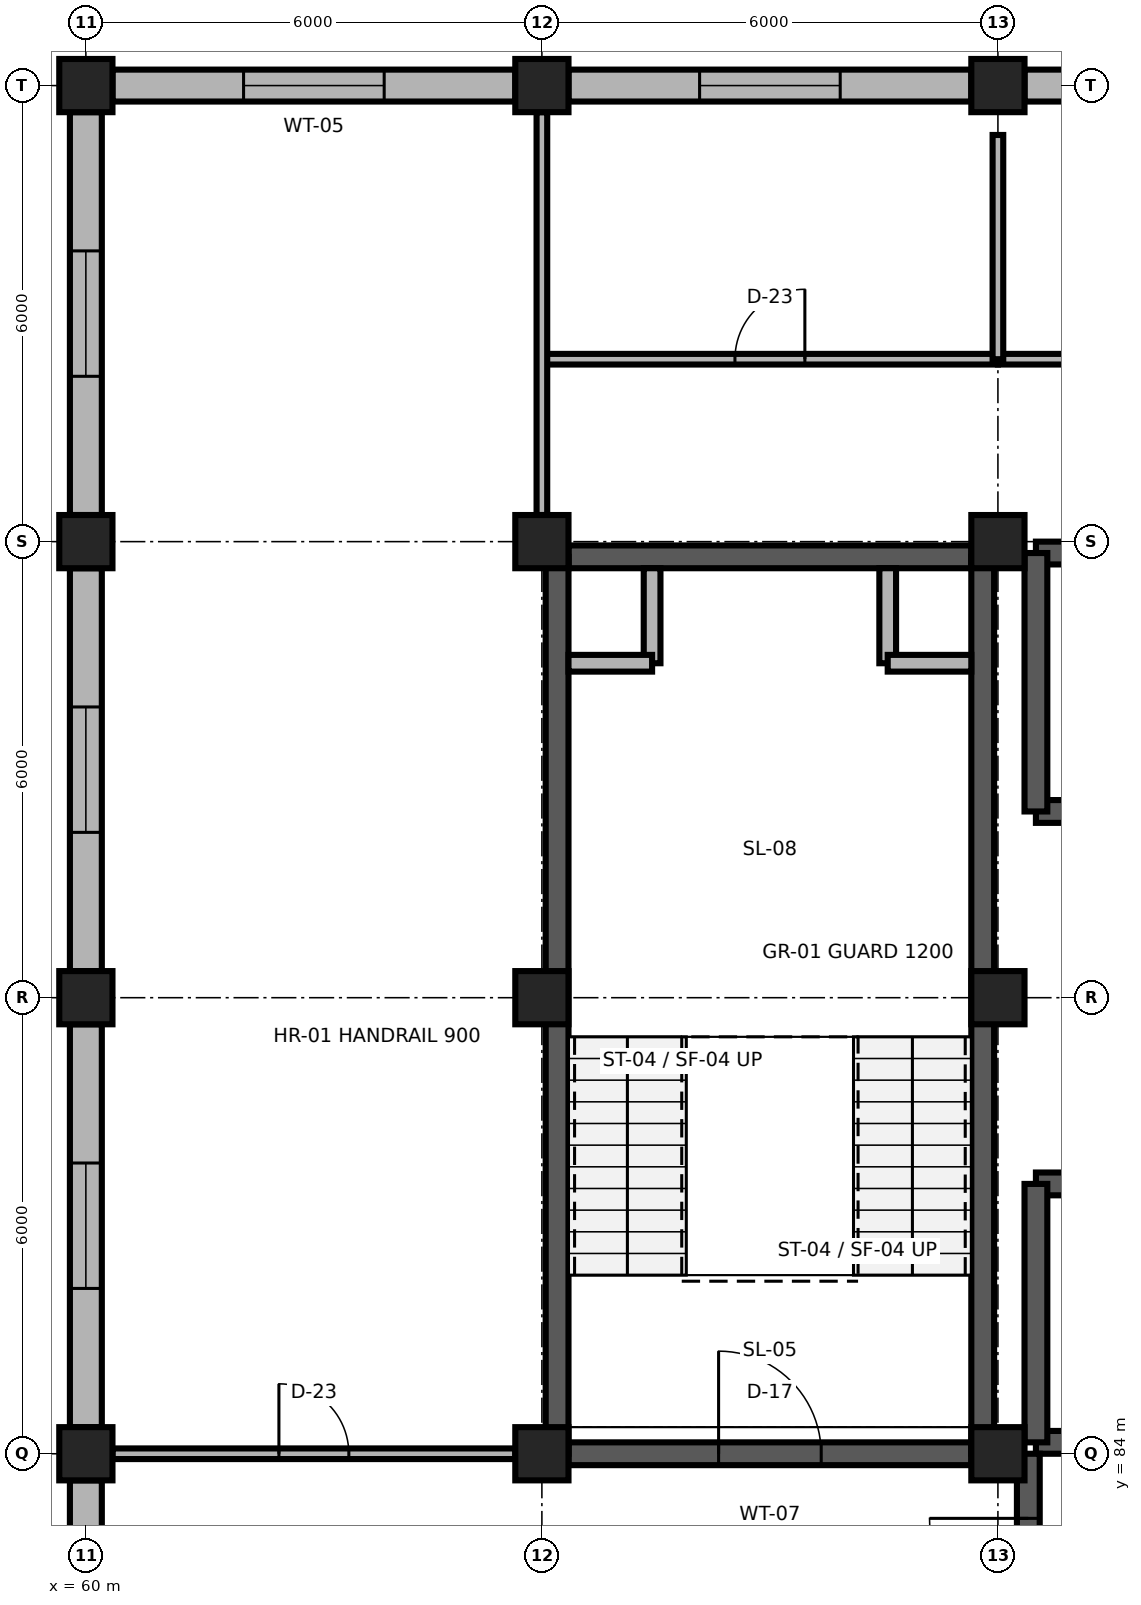
"""IFC4 building model, lengths in metres.
Left out: names, types, materials, properties, quantities, classifications, styles, units other than length and angle.
Written with IfcOpenShell. Run it as: python <this file> out.ifc"""

import sys

from ifc_helpers import new_model, si_unit, direction, frame, frame_2d, origin, origin_2d, place, context, subcontext, project, spatial, rectangle, extrude, element, fill, save


model = new_model("IFC4")
c1 = context("Model", 3, precision=1e-05, world=origin(), true_north=direction((0.0, 1.0)))
c2 = subcontext(c1, "Body", "Model", "MODEL_VIEW")
j1 = project(units=[si_unit("LENGTHUNIT", "METRE"), si_unit("PLANEANGLEUNIT", "RADIAN")], contexts=[c1])
p1 = place(None, origin())
s1 = spatial("IfcSite", under=j1, at=p1, CompositionType="ELEMENT")
p2 = place(p1, origin())
s2 = spatial("IfcBuilding", under=s1, at=p2, CompositionType="ELEMENT")
p3 = place(p2, frame((0.0, 0.0, 48.3)))
s3 = spatial("IfcBuildingStorey", under=s2, at=p3, CompositionType="ELEMENT", Elevation=48.3)
for number, where, z_axis, x_axis in (
    (1, (60.0, 84.0, 0.0), (0.0, 0.0, 1.0), (1.0, 0.0, 0.0)),
    (2, (66.0, 84.0, 0.0), (0.0, 0.0, 1.0), (1.0, 0.0, 0.0)),
    (3, (72.0, 84.0, 0.0), (0.0, 0.0, 1.0), (1.0, 0.0, 0.0)),
    (4, (60.0, 90.0, 0.0), (0.0, 0.0, 1.0), (1.0, 0.0, 0.0)),
    (5, (66.0, 90.0, 0.0), (0.0, 0.0, 1.0), (1.0, 0.0, 0.0)),
    (6, (72.0, 90.0, 0.0), (0.0, 0.0, 1.0), (1.0, 0.0, 0.0)),
    (7, (60.0, 96.0, 0.0), (0.0, 0.0, 1.0), (1.0, 0.0, 0.0)),
    (8, (66.0, 96.0, 0.0), (0.0, 0.0, 1.0), (1.0, 0.0, 0.0)),
    (9, (72.0, 96.0, 0.0), (0.0, 0.0, 1.0), (1.0, 0.0, 0.0)),
    (10, (60.0, 102.0, 0.0), (0.0, 0.0, 1.0), (1.0, 0.0, 0.0)),
    (11, (66.0, 102.0, 0.0), (0.0, 0.0, 1.0), (1.0, 0.0, 0.0)),
    (12, (72.0, 102.0, 0.0), (0.0, 0.0, 1.0), (1.0, 0.0, 0.0)),
):
    element("IfcColumn", number, at=place(p3, frame(where, z_axis=z_axis, x_axis=x_axis)), inside=s3, PredefinedType="COLUMN", context=c2, shape_type="SweptSolid", body=[
        extrude(rectangle(XDim=0.7, YDim=0.7, at=origin_2d()), origin(), (0.0, 0.0, 1.0), 3.9),
    ])
p4 = place(p3, frame((60.35, 102.0, 0.0), z_axis=(0.0, 0.0, 1.0), x_axis=(1.0, 0.0, 0.0)))
e13 = element("IfcWall", 13, at=p4, inside=s3, PredefinedType="SOLIDWALL", context=c2, shape_type="SweptSolid", body=[
    extrude(rectangle(XDim=5.3, YDim=0.42, at=frame_2d((2.65, 0.0))), origin(), (0.0, 0.0, 1.0), 3.26),
])
p5 = place(p4, frame((1.725, 0.0, 0.85)))
e14 = element("IfcOpeningElement", 14, at=p5, cuts=e13, PredefinedType="OPENING", context=c2, shape_type="SweptSolid", body=[
    extrude(rectangle(XDim=1.85, YDim=2.0, at=frame_2d((0.925, 1.0))), frame((0.0, 0.225, 0.0), z_axis=(0.0, -1.0, 0.0), x_axis=(1.0, 0.0, 0.0)), (0.0, 0.0, 1.0), 0.45),
])
p6 = place(p3, frame((66.35, 102.0, 0.0), z_axis=(0.0, 0.0, 1.0), x_axis=(1.0, 0.0, 0.0)))
e15 = element("IfcWall", 15, at=p6, inside=s3, PredefinedType="SOLIDWALL", context=c2, shape_type="SweptSolid", body=[
    extrude(rectangle(XDim=5.3, YDim=0.42, at=frame_2d((2.65, 0.0))), origin(), (0.0, 0.0, 1.0), 3.26),
])
p7 = place(p6, frame((1.725, 0.0, 0.85)))
e16 = element("IfcOpeningElement", 16, at=p7, cuts=e15, PredefinedType="OPENING", context=c2, shape_type="SweptSolid", body=[
    extrude(rectangle(XDim=1.85, YDim=2.0, at=frame_2d((0.925, 1.0))), frame((0.0, 0.225, 0.0), z_axis=(0.0, -1.0, 0.0), x_axis=(1.0, 0.0, 0.0)), (0.0, 0.0, 1.0), 0.45),
])
p8 = place(p3, frame((72.35, 102.0, 0.0), z_axis=(0.0, 0.0, 1.0), x_axis=(1.0, 0.0, 0.0)))
e17 = element("IfcWall", 17, at=p8, inside=s3, PredefinedType="SOLIDWALL", context=c2, shape_type="SweptSolid", body=[
    extrude(rectangle(XDim=5.3, YDim=0.42, at=frame_2d((2.65, 0.0))), origin(), (0.0, 0.0, 1.0), 3.26),
])
p9 = place(p8, frame((1.725, 0.0, 0.85)))
e18 = element("IfcOpeningElement", 18, at=p9, cuts=e17, PredefinedType="OPENING", context=c2, shape_type="SweptSolid", body=[
    extrude(rectangle(XDim=1.85, YDim=2.0, at=frame_2d((0.925, 1.0))), frame((0.0, 0.225, 0.0), z_axis=(0.0, -1.0, 0.0), x_axis=(1.0, 0.0, 0.0)), (0.0, 0.0, 1.0), 0.45),
])
p10 = place(p3, frame((60.0, 78.35, 0.0), z_axis=(0.0, 0.0, 1.0), x_axis=(0.0, 1.0, 0.0)))
e19 = element("IfcWall", 19, at=p10, inside=s3, PredefinedType="SOLIDWALL", context=c2, shape_type="SweptSolid", body=[
    extrude(rectangle(XDim=5.3, YDim=0.42, at=frame_2d((2.65, 0.0))), origin(), (0.0, 0.0, 1.0), 3.26),
])
p11 = place(p10, frame((1.825, 0.0, 0.85)))
e20 = element("IfcOpeningElement", 20, at=p11, cuts=e19, PredefinedType="OPENING", context=c2, shape_type="SweptSolid", body=[
    extrude(rectangle(XDim=1.65, YDim=1.95, at=frame_2d((0.825, 0.975))), frame((0.0, 0.225, 0.0), z_axis=(0.0, -1.0, 0.0), x_axis=(1.0, 0.0, 0.0)), (0.0, 0.0, 1.0), 0.45),
])
p12 = place(p3, frame((60.0, 84.35, 0.0), z_axis=(0.0, 0.0, 1.0), x_axis=(0.0, 1.0, 0.0)))
e21 = element("IfcWall", 21, at=p12, inside=s3, PredefinedType="SOLIDWALL", context=c2, shape_type="SweptSolid", body=[
    extrude(rectangle(XDim=5.3, YDim=0.42, at=frame_2d((2.65, 0.0))), origin(), (0.0, 0.0, 1.0), 3.26),
])
p13 = place(p12, frame((1.825, 0.0, 0.85)))
e22 = element("IfcOpeningElement", 22, at=p13, cuts=e21, PredefinedType="OPENING", context=c2, shape_type="SweptSolid", body=[
    extrude(rectangle(XDim=1.65, YDim=1.95, at=frame_2d((0.825, 0.975))), frame((0.0, 0.225, 0.0), z_axis=(0.0, -1.0, 0.0), x_axis=(1.0, 0.0, 0.0)), (0.0, 0.0, 1.0), 0.45),
])
p14 = place(p3, frame((60.0, 90.35, 0.0), z_axis=(0.0, 0.0, 1.0), x_axis=(0.0, 1.0, 0.0)))
e23 = element("IfcWall", 23, at=p14, inside=s3, PredefinedType="SOLIDWALL", context=c2, shape_type="SweptSolid", body=[
    extrude(rectangle(XDim=5.3, YDim=0.42, at=frame_2d((2.65, 0.0))), origin(), (0.0, 0.0, 1.0), 3.26),
])
p15 = place(p14, frame((1.825, 0.0, 0.85)))
e24 = element("IfcOpeningElement", 24, at=p15, cuts=e23, PredefinedType="OPENING", context=c2, shape_type="SweptSolid", body=[
    extrude(rectangle(XDim=1.65, YDim=1.95, at=frame_2d((0.825, 0.975))), frame((0.0, 0.225, 0.0), z_axis=(0.0, -1.0, 0.0), x_axis=(1.0, 0.0, 0.0)), (0.0, 0.0, 1.0), 0.45),
])
p16 = place(p3, frame((60.0, 96.35, 0.0), z_axis=(0.0, 0.0, 1.0), x_axis=(0.0, 1.0, 0.0)))
e25 = element("IfcWall", 25, at=p16, inside=s3, PredefinedType="SOLIDWALL", context=c2, shape_type="SweptSolid", body=[
    extrude(rectangle(XDim=5.3, YDim=0.42, at=frame_2d((2.65, 0.0))), origin(), (0.0, 0.0, 1.0), 3.26),
])
p17 = place(p16, frame((1.825, 0.0, 0.85)))
e26 = element("IfcOpeningElement", 26, at=p17, cuts=e25, PredefinedType="OPENING", context=c2, shape_type="SweptSolid", body=[
    extrude(rectangle(XDim=1.65, YDim=1.95, at=frame_2d((0.825, 0.975))), frame((0.0, 0.225, 0.0), z_axis=(0.0, -1.0, 0.0), x_axis=(1.0, 0.0, 0.0)), (0.0, 0.0, 1.0), 0.45),
])
p18 = place(p3, frame((66.35, 84.0, 0.0), z_axis=(0.0, 0.0, 1.0), x_axis=(1.0, 0.0, 0.0)))
e27 = element("IfcWall", 27, at=p18, inside=s3, PredefinedType="SHEAR", context=c2, shape_type="SweptSolid", body=[
    extrude(rectangle(XDim=5.3, YDim=0.3, at=frame_2d((2.65, 0.0))), origin(), (0.0, 0.0, 1.0), 3.66),
])
p19 = place(p18, frame((1.975, 0.0, 0.0)))
e28 = element("IfcOpeningElement", 28, at=p19, cuts=e27, PredefinedType="OPENING", context=c2, shape_type="SweptSolid", body=[
    extrude(rectangle(XDim=1.35, YDim=2.2, at=frame_2d((0.675, 1.1))), frame((0.0, 0.165, 0.0), z_axis=(0.0, -1.0, 0.0), x_axis=(1.0, 0.0, 0.0)), (0.0, 0.0, 1.0), 0.33),
])
p20 = place(p3, frame((66.35, 95.8, 0.0), z_axis=(0.0, 0.0, 1.0), x_axis=(1.0, 0.0, 0.0)))
e29 = element("IfcWall", 29, at=p20, inside=s3, PredefinedType="SHEAR", context=c2, shape_type="SweptSolid", body=[
    extrude(rectangle(XDim=5.3, YDim=0.3, at=frame_2d((2.65, 0.0))), origin(), (0.0, 0.0, 1.0), 3.74),
])
for number, where, z_axis, x_axis in (
    (30, (66.2, 84.0, 0.0), (0.0, 0.0, 1.0), (0.0, 1.0, 0.0)),
    (31, (71.8, 84.0, 0.0), (0.0, 0.0, 1.0), (0.0, 1.0, 0.0)),
):
    element("IfcWall", number, at=place(p3, frame(where, z_axis=z_axis, x_axis=x_axis)), inside=s3, PredefinedType="SHEAR", context=c2, shape_type="SweptSolid", body=[
        extrude(rectangle(XDim=11.8, YDim=0.3, at=frame_2d((5.9, 0.0))), origin(), (0.0, 0.0, 1.0), 3.74),
    ])
p21 = place(p3, frame((67.45, 94.4, 0.0), z_axis=(0.0, 0.0, 1.0), x_axis=(0.0, 1.0, 0.0)))
e32 = element("IfcWall", 32, at=p21, inside=s3, PredefinedType="PARTITIONING", context=c2, shape_type="SweptSolid", body=[
    extrude(rectangle(XDim=1.25, YDim=0.22, at=frame_2d((0.625, 0.0))), origin(), (0.0, 0.0, 1.0), 3.74),
])
p22 = place(p3, frame((66.35, 94.4, 0.0), z_axis=(0.0, 0.0, 1.0), x_axis=(1.0, 0.0, 0.0)))
e33 = element("IfcWall", 33, at=p22, inside=s3, PredefinedType="PARTITIONING", context=c2, shape_type="SweptSolid", body=[
    extrude(rectangle(XDim=1.1, YDim=0.22, at=frame_2d((0.55, 0.0))), origin(), (0.0, 0.0, 1.0), 3.74),
])
p23 = place(p3, frame((70.55, 94.4, 0.0), z_axis=(0.0, 0.0, 1.0), x_axis=(0.0, 1.0, 0.0)))
e34 = element("IfcWall", 34, at=p23, inside=s3, PredefinedType="PARTITIONING", context=c2, shape_type="SweptSolid", body=[
    extrude(rectangle(XDim=1.25, YDim=0.22, at=frame_2d((0.625, 0.0))), origin(), (0.0, 0.0, 1.0), 3.74),
])
p24 = place(p3, frame((70.55, 94.4, 0.0), z_axis=(0.0, 0.0, 1.0), x_axis=(1.0, 0.0, 0.0)))
e35 = element("IfcWall", 35, at=p24, inside=s3, PredefinedType="PARTITIONING", context=c2, shape_type="SweptSolid", body=[
    extrude(rectangle(XDim=1.1, YDim=0.22, at=frame_2d((0.55, 0.0))), origin(), (0.0, 0.0, 1.0), 3.74),
])
p25 = place(p3, frame((72.5, 84.15, 0.0), z_axis=(0.0, 0.0, 1.0), x_axis=(1.0, 0.0, 0.0)))
e36 = element("IfcWall", 36, at=p25, inside=s3, PredefinedType="SHEAR", context=c2, shape_type="SweptSolid", body=[
    extrude(rectangle(XDim=2.5, YDim=0.3, at=frame_2d((1.25, 0.0))), origin(), (0.0, 0.0, 1.0), 3.74),
])
p26 = place(p25, frame((0.7, 0.0, 0.0)))
e37 = element("IfcOpeningElement", 37, at=p26, cuts=e36, PredefinedType="OPENING", context=c2, shape_type="SweptSolid", body=[
    extrude(rectangle(XDim=1.1, YDim=2.1, at=frame_2d((0.55, 1.05))), frame((0.0, 0.165, 0.0), z_axis=(0.0, -1.0, 0.0), x_axis=(1.0, 0.0, 0.0)), (0.0, 0.0, 1.0), 0.33),
])
p27 = place(p3, frame((72.5, 87.55, 0.0), z_axis=(0.0, 0.0, 1.0), x_axis=(1.0, 0.0, 0.0)))
e38 = element("IfcWall", 38, at=p27, inside=s3, PredefinedType="SHEAR", context=c2, shape_type="SweptSolid", body=[
    extrude(rectangle(XDim=2.5, YDim=0.3, at=frame_2d((1.25, 0.0))), origin(), (0.0, 0.0, 1.0), 3.74),
])
p28 = place(p3, frame((72.5, 84.15, 0.0), z_axis=(0.0, 0.0, 1.0), x_axis=(0.0, 1.0, 0.0)))
e39 = element("IfcWall", 39, at=p28, inside=s3, PredefinedType="SHEAR", context=c2, shape_type="SweptSolid", body=[
    extrude(rectangle(XDim=3.4, YDim=0.3, at=frame_2d((1.7, 0.0))), origin(), (0.0, 0.0, 1.0), 3.74),
])
p29 = place(p3, frame((72.5, 95.85, 0.0), z_axis=(0.0, 0.0, 1.0), x_axis=(1.0, 0.0, 0.0)))
e40 = element("IfcWall", 40, at=p29, inside=s3, PredefinedType="SHEAR", context=c2, shape_type="SweptSolid", body=[
    extrude(rectangle(XDim=2.5, YDim=0.3, at=frame_2d((1.25, 0.0))), origin(), (0.0, 0.0, 1.0), 3.74),
])
p30 = place(p29, frame((0.675, 0.0, 0.0)))
e41 = element("IfcOpeningElement", 41, at=p30, cuts=e40, PredefinedType="OPENING", context=c2, shape_type="SweptSolid", body=[
    extrude(rectangle(XDim=1.15, YDim=2.15, at=frame_2d((0.575, 1.075))), frame((0.0, 0.165, 0.0), z_axis=(0.0, -1.0, 0.0), x_axis=(1.0, 0.0, 0.0)), (0.0, 0.0, 1.0), 0.33),
])
p31 = place(p3, frame((72.5, 92.45, 0.0), z_axis=(0.0, 0.0, 1.0), x_axis=(1.0, 0.0, 0.0)))
e42 = element("IfcWall", 42, at=p31, inside=s3, PredefinedType="SHEAR", context=c2, shape_type="SweptSolid", body=[
    extrude(rectangle(XDim=2.5, YDim=0.3, at=frame_2d((1.25, 0.0))), origin(), (0.0, 0.0, 1.0), 3.74),
])
p32 = place(p3, frame((72.5, 92.45, 0.0), z_axis=(0.0, 0.0, 1.0), x_axis=(0.0, 1.0, 0.0)))
e43 = element("IfcWall", 43, at=p32, inside=s3, PredefinedType="SHEAR", context=c2, shape_type="SweptSolid", body=[
    extrude(rectangle(XDim=3.4, YDim=0.3, at=frame_2d((1.7, 0.0))), origin(), (0.0, 0.0, 1.0), 3.74),
])
p33 = place(p3, frame((72.4, 81.0, 0.0), z_axis=(0.0, 0.0, 1.0), x_axis=(0.0, 1.0, 0.0)))
e44 = element("IfcWall", 44, at=p33, inside=s3, PredefinedType="SHEAR", context=c2, shape_type="SweptSolid", body=[
    extrude(rectangle(XDim=3.0, YDim=0.3, at=frame_2d((1.5, 0.0))), origin(), (0.0, 0.0, 1.0), 3.68),
])
p34 = place(p33, frame((0.85, 0.0, 0.0)))
e45 = element("IfcOpeningElement", 45, at=p34, cuts=e44, PredefinedType="OPENING", context=c2, shape_type="SweptSolid", body=[
    extrude(rectangle(XDim=1.3, YDim=2.2, at=frame_2d((0.65, 1.1))), frame((0.0, 0.165, 0.0), z_axis=(0.0, -1.0, 0.0), x_axis=(1.0, 0.0, 0.0)), (0.0, 0.0, 1.0), 0.33),
])
p35 = place(p3, frame((60.35, 84.0, 0.0), z_axis=(0.0, 0.0, 1.0), x_axis=(1.0, 0.0, 0.0)))
e46 = element("IfcWall", 46, at=p35, inside=s3, PredefinedType="PARTITIONING", context=c2, shape_type="SweptSolid", body=[
    extrude(rectangle(XDim=5.3, YDim=0.14, at=frame_2d((2.65, 0.0))), origin(), (0.0, 0.0, 1.0), 3.288),
])
p36 = place(p35, frame((2.19, 0.0, 0.0)))
e47 = element("IfcOpeningElement", 47, at=p36, cuts=e46, PredefinedType="OPENING", context=c2, shape_type="SweptSolid", body=[
    extrude(rectangle(XDim=0.92, YDim=2.15, at=frame_2d((0.46, 1.075))), frame((0.0, 0.085, 0.0), z_axis=(0.0, -1.0, 0.0), x_axis=(1.0, 0.0, 0.0)), (0.0, 0.0, 1.0), 0.17),
])
p37 = place(p3, frame((66.0, 98.4, 0.0), z_axis=(0.0, 0.0, 1.0), x_axis=(1.0, 0.0, 0.0)))
e48 = element("IfcWall", 48, at=p37, inside=s3, PredefinedType="PARTITIONING", context=c2, shape_type="SweptSolid", body=[
    extrude(rectangle(XDim=6.0, YDim=0.14, at=frame_2d((3.0, 0.0))), origin(), (0.0, 0.0, 1.0), 3.68),
])
p38 = place(p37, frame((2.54, 0.0, 0.0)))
e49 = element("IfcOpeningElement", 49, at=p38, cuts=e48, PredefinedType="OPENING", context=c2, shape_type="SweptSolid", body=[
    extrude(rectangle(XDim=0.92, YDim=2.15, at=frame_2d((0.46, 1.075))), frame((0.0, 0.085, 0.0), z_axis=(0.0, -1.0, 0.0), x_axis=(1.0, 0.0, 0.0)), (0.0, 0.0, 1.0), 0.17),
])
p39 = place(p3, frame((72.0, 98.4, 0.0), z_axis=(0.0, 0.0, 1.0), x_axis=(1.0, 0.0, 0.0)))
e50 = element("IfcWall", 50, at=p39, inside=s3, PredefinedType="PARTITIONING", context=c2, shape_type="SweptSolid", body=[
    extrude(rectangle(XDim=6.0, YDim=0.14, at=frame_2d((3.0, 0.0))), origin(), (0.0, 0.0, 1.0), 3.68),
])
p40 = place(p39, frame((2.54, 0.0, 0.0)))
e51 = element("IfcOpeningElement", 51, at=p40, cuts=e50, PredefinedType="OPENING", context=c2, shape_type="SweptSolid", body=[
    extrude(rectangle(XDim=0.92, YDim=2.15, at=frame_2d((0.46, 1.075))), frame((0.0, 0.085, 0.0), z_axis=(0.0, -1.0, 0.0), x_axis=(1.0, 0.0, 0.0)), (0.0, 0.0, 1.0), 0.17),
])
p41 = place(p3, frame((72.0, 98.4, 0.0), z_axis=(0.0, 0.0, 1.0), x_axis=(0.0, 1.0, 0.0)))
e52 = element("IfcWall", 52, at=p41, inside=s3, PredefinedType="PARTITIONING", context=c2, shape_type="SweptSolid", body=[
    extrude(rectangle(XDim=2.95, YDim=0.14, at=frame_2d((1.475, 0.0))), origin(), (0.0, 0.0, 1.0), 3.288),
])
p42 = place(p3, frame((66.0, 96.35, 0.0), z_axis=(0.0, 0.0, 1.0), x_axis=(0.0, 1.0, 0.0)))
e53 = element("IfcWall", 53, at=p42, inside=s3, PredefinedType="PARTITIONING", context=c2, shape_type="SweptSolid", body=[
    extrude(rectangle(XDim=5.3, YDim=0.14, at=frame_2d((2.65, 0.0))), origin(), (0.0, 0.0, 1.0), 3.288),
])
p43 = place(p5, origin())
e54 = element("IfcWindow", 54, at=p43, inside=s3, PartitioningType="SINGLE_PANEL", PredefinedType="WINDOW", context=c2, shape_type="SweptSolid", body=[
    extrude(rectangle(XDim=1.85, YDim=2.0, at=frame_2d((0.925, 1.0))), frame((0.0, 0.03, 0.0), z_axis=(0.0, -1.0, 0.0), x_axis=(1.0, 0.0, 0.0)), (0.0, 0.0, 1.0), 0.06),
])
fill(e14, e54)
p44 = place(p7, origin())
e55 = element("IfcWindow", 55, at=p44, inside=s3, PartitioningType="SINGLE_PANEL", PredefinedType="WINDOW", context=c2, shape_type="SweptSolid", body=[
    extrude(rectangle(XDim=1.85, YDim=2.0, at=frame_2d((0.925, 1.0))), frame((0.0, 0.03, 0.0), z_axis=(0.0, -1.0, 0.0), x_axis=(1.0, 0.0, 0.0)), (0.0, 0.0, 1.0), 0.06),
])
fill(e16, e55)
p45 = place(p13, origin())
e56 = element("IfcWindow", 56, at=p45, inside=s3, PartitioningType="SINGLE_PANEL", PredefinedType="WINDOW", context=c2, shape_type="SweptSolid", body=[
    extrude(rectangle(XDim=1.65, YDim=1.95, at=frame_2d((0.825, 0.975))), frame((0.0, 0.03, 0.0), z_axis=(0.0, -1.0, 0.0), x_axis=(1.0, 0.0, 0.0)), (0.0, 0.0, 1.0), 0.06),
])
fill(e22, e56)
p46 = place(p15, origin())
e57 = element("IfcWindow", 57, at=p46, inside=s3, PartitioningType="SINGLE_PANEL", PredefinedType="WINDOW", context=c2, shape_type="SweptSolid", body=[
    extrude(rectangle(XDim=1.65, YDim=1.95, at=frame_2d((0.825, 0.975))), frame((0.0, 0.03, 0.0), z_axis=(0.0, -1.0, 0.0), x_axis=(1.0, 0.0, 0.0)), (0.0, 0.0, 1.0), 0.06),
])
fill(e24, e57)
p47 = place(p17, origin())
e58 = element("IfcWindow", 58, at=p47, inside=s3, PartitioningType="SINGLE_PANEL", PredefinedType="WINDOW", context=c2, shape_type="SweptSolid", body=[
    extrude(rectangle(XDim=1.65, YDim=1.95, at=frame_2d((0.825, 0.975))), frame((0.0, 0.03, 0.0), z_axis=(0.0, -1.0, 0.0), x_axis=(1.0, 0.0, 0.0)), (0.0, 0.0, 1.0), 0.06),
])
fill(e26, e58)
p48 = place(p19, origin())
e59 = element("IfcDoor", 59, at=p48, inside=s3, OperationType="SINGLE_SWING_LEFT", PredefinedType="DOOR", context=c2, shape_type="SweptSolid", body=[
    extrude(rectangle(XDim=1.35, YDim=2.2, at=frame_2d((0.675, 1.1))), frame((0.0, 0.025, 0.0), z_axis=(0.0, -1.0, 0.0), x_axis=(1.0, 0.0, 0.0)), (0.0, 0.0, 1.0), 0.05),
])
fill(e28, e59)
p49 = place(p34, origin())
e60 = element("IfcDoor", 60, at=p49, inside=s3, OperationType="SINGLE_SWING_RIGHT", PredefinedType="DOOR", context=c2, shape_type="SweptSolid", body=[
    extrude(rectangle(XDim=1.3, YDim=2.2, at=frame_2d((0.65, 1.1))), frame((0.0, 0.025, 0.0), z_axis=(0.0, -1.0, 0.0), x_axis=(1.0, 0.0, 0.0)), (0.0, 0.0, 1.0), 0.05),
])
fill(e45, e60)
p50 = place(p36, origin())
e61 = element("IfcDoor", 61, at=p50, inside=s3, OperationType="SINGLE_SWING_LEFT", PredefinedType="DOOR", context=c2, shape_type="SweptSolid", body=[
    extrude(rectangle(XDim=0.92, YDim=2.15, at=frame_2d((0.46, 1.075))), frame((0.0, 0.025, 0.0), z_axis=(0.0, -1.0, 0.0), x_axis=(1.0, 0.0, 0.0)), (0.0, 0.0, 1.0), 0.05),
])
fill(e47, e61)
p51 = place(p38, origin())
e62 = element("IfcDoor", 62, at=p51, inside=s3, OperationType="SINGLE_SWING_RIGHT", PredefinedType="DOOR", context=c2, shape_type="SweptSolid", body=[
    extrude(rectangle(XDim=0.92, YDim=2.15, at=frame_2d((0.46, 1.075))), frame((0.0, 0.025, 0.0), z_axis=(0.0, -1.0, 0.0), x_axis=(1.0, 0.0, 0.0)), (0.0, 0.0, 1.0), 0.05),
])
fill(e49, e62)
save(model, sys.argv[1])
